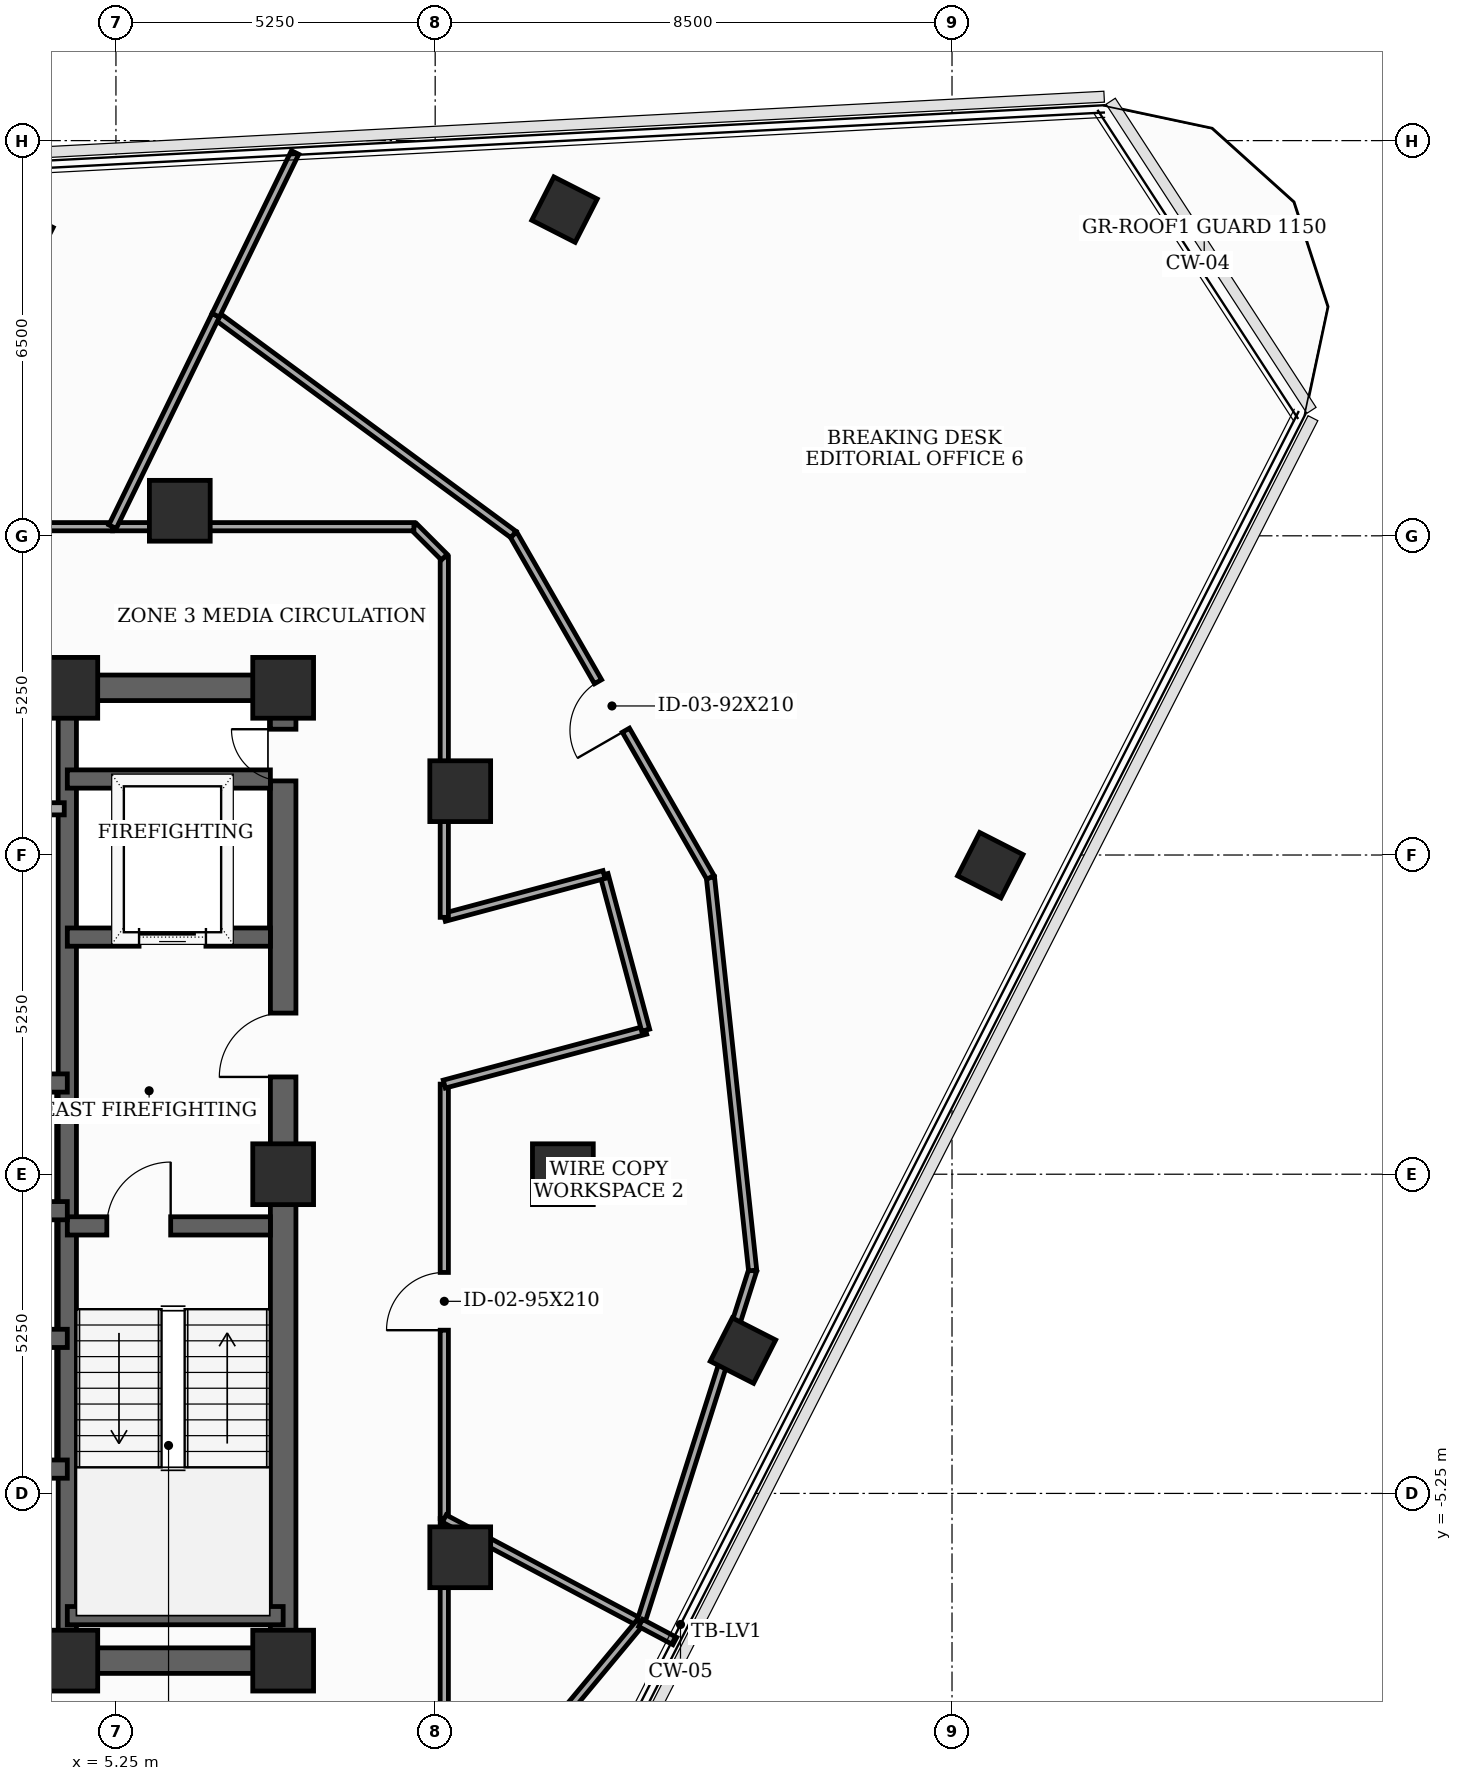
"""IFC4 building model, lengths in metres.
Left out: names, types, materials, properties, quantities, classifications, styles, units other than length and angle.
Written with IfcOpenShell. Run it as: python <this file> out.ifc"""

import sys

from ifc_helpers import new_model, si_unit, direction, frame, frame_2d, origin, origin_2d, place, context, subcontext, project, spatial, rectangle, extrude, element, fill, save


model = new_model("IFC4")
c1 = context("Model", 3, precision=1e-05, world=origin(), true_north=direction((0.0, 1.0)))
c2 = subcontext(c1, "Body", "Model", "MODEL_VIEW")
j1 = project(units=[si_unit("LENGTHUNIT", "METRE"), si_unit("PLANEANGLEUNIT", "RADIAN")], contexts=[c1])
p1 = place(None, origin())
s1 = spatial("IfcSite", under=j1, at=p1, CompositionType="ELEMENT")
p2 = place(p1, origin())
s2 = spatial("IfcBuilding", under=s1, at=p2, CompositionType="ELEMENT")
p3 = place(p2, frame((0.0, 0.0, 259.6)))
s3 = spatial("IfcBuildingStorey", under=s2, at=p3, CompositionType="ELEMENT", Elevation=259.6)
for number, where, z_axis, x_axis in (
    (1, (4.45, -8.0, 0.0), (0.0, 0.0, 1.0), (1.0, 0.0, 0.0)),
    (2, (8.0, -8.0, 0.0), (0.0, 0.0, 1.0), (1.0, 0.0, 0.0)),
    (3, (8.0, 0.0, 0.0), (0.0, 0.0, 1.0), (1.0, 0.0, 0.0)),
    (4, (8.0, 8.0, 0.0), (0.0, 0.0, 1.0), (1.0, 0.0, 0.0)),
    (5, (4.45, 8.0, 0.0), (0.0, 0.0, 1.0), (1.0, 0.0, 0.0)),
    (6, (12.6, 0.0, 0.0), (0.0, 0.0, 1.0), (1.0, 0.0, 0.0)),
    (7, (10.912, 6.3, 0.0), (0.0, 0.0, 1.0), (1.0, 0.0, 0.0)),
    (8, (6.3, 10.912, 0.0), (0.0, 0.0, 1.0), (1.0, 0.0, 0.0)),
    (9, (10.912, -6.3, 0.0), (0.0, 0.0, 1.0), (1.0, 0.0, 0.0)),
):
    element("IfcColumn", number, at=place(p3, frame(where, z_axis=z_axis, x_axis=x_axis)), inside=s3, PredefinedType="COLUMN", context=c2, shape_type="SweptSolid", body=[
        extrude(rectangle(XDim=1.0, YDim=1.0, at=origin_2d()), origin(), (0.0, 0.0, 1.0), 3.7),
    ])
for number, where, z_axis, x_axis in (
    (10, (15.562, -2.901, 0.0), (0.0, 0.0, 1.0), (0.454, 0.891, 0.0)),
    (11, (19.629, 5.082, 0.0), (0.0, 0.0, 1.0), (0.454, 0.891, 0.0)),
    (12, (12.627, 15.865, 0.0), (0.0, 0.0, 1.0), (0.454, 0.891, 0.0)),
    (13, (3.679, 15.396, 0.0), (0.0, 0.0, 1.0), (0.454, 0.891, 0.0)),
):
    element("IfcColumn", number, at=place(p3, frame(where, z_axis=z_axis, x_axis=x_axis)), inside=s3, PredefinedType="COLUMN", context=c2, shape_type="SweptSolid", body=[
        extrude(rectangle(XDim=0.8, YDim=0.8, at=origin_2d()), origin(), (0.0, 0.0, 1.0), 3.7),
    ])
p4 = place(p3, frame((8.0, -8.0, 0.0), z_axis=(0.0, 0.0, 1.0), x_axis=(0.0, 1.0, 0.0)))
e14 = element("IfcWall", 14, at=p4, inside=s3, PredefinedType="SHEAR", context=c2, shape_type="SweptSolid", body=[
    extrude(rectangle(XDim=16.0, YDim=0.42, at=frame_2d((8.0, 0.0))), origin(), (0.0, 0.0, 1.0), 3.5),
])
p5 = place(p4, frame((9.6, 0.0, 0.0)))
e15 = element("IfcOpeningElement", 15, at=p5, cuts=e14, PredefinedType="OPENING", context=c2, shape_type="SweptSolid", body=[
    extrude(rectangle(XDim=1.05, YDim=2.15, at=frame_2d((0.525, 1.075))), frame((0.0, 0.22, 0.0), z_axis=(0.0, -1.0, 0.0), x_axis=(1.0, 0.0, 0.0)), (0.0, 0.0, 1.0), 0.44),
])
p6 = place(p4, frame((14.469, 0.0, 0.0)))
e16 = element("IfcOpeningElement", 16, at=p6, cuts=e14, PredefinedType="OPENING", context=c2, shape_type="SweptSolid", body=[
    extrude(rectangle(XDim=0.85, YDim=2.02, at=frame_2d((0.425, 1.01))), frame((0.0, 0.22, 0.0), z_axis=(0.0, -1.0, 0.0), x_axis=(1.0, 0.0, 0.0)), (0.0, 0.0, 1.0), 0.44),
])
p7 = place(p3, frame((-8.0, -8.0, 0.0), z_axis=(0.0, 0.0, 1.0), x_axis=(1.0, 0.0, 0.0)))
e17 = element("IfcWall", 17, at=p7, inside=s3, PredefinedType="SHEAR", context=c2, shape_type="SweptSolid", body=[
    extrude(rectangle(XDim=16.0, YDim=0.42, at=frame_2d((8.0, 0.0))), origin(), (0.0, 0.0, 1.0), 3.5),
])
p8 = place(p7, frame((5.2, 0.0, 0.0)))
e18 = element("IfcOpeningElement", 18, at=p8, cuts=e17, PredefinedType="OPENING", context=c2, shape_type="SweptSolid", body=[
    extrude(rectangle(XDim=0.95, YDim=2.1, at=frame_2d((0.475, 1.05))), frame((0.0, 0.22, 0.0), z_axis=(0.0, -1.0, 0.0), x_axis=(1.0, 0.0, 0.0)), (0.0, 0.0, 1.0), 0.44),
])
p9 = place(p7, frame((9.8, 0.0, 0.0)))
e19 = element("IfcOpeningElement", 19, at=p9, cuts=e17, PredefinedType="OPENING", context=c2, shape_type="SweptSolid", body=[
    extrude(rectangle(XDim=0.95, YDim=2.1, at=frame_2d((0.475, 1.05))), frame((0.0, 0.22, 0.0), z_axis=(0.0, -1.0, 0.0), x_axis=(1.0, 0.0, 0.0)), (0.0, 0.0, 1.0), 0.44),
])
p10 = place(p3, frame((-8.0, 8.0, 0.0), z_axis=(0.0, 0.0, 1.0), x_axis=(1.0, 0.0, 0.0)))
e20 = element("IfcWall", 20, at=p10, inside=s3, PredefinedType="SHEAR", context=c2, shape_type="SweptSolid", body=[
    extrude(rectangle(XDim=16.0, YDim=0.42, at=frame_2d((8.0, 0.0))), origin(), (0.0, 0.0, 1.0), 3.5),
])
p11 = place(p10, frame((7.1, 0.0, 0.0)))
e21 = element("IfcOpeningElement", 21, at=p11, cuts=e20, PredefinedType="OPENING", context=c2, shape_type="SweptSolid", body=[
    extrude(rectangle(XDim=1.8, YDim=2.15, at=frame_2d((0.9, 1.075))), frame((0.0, 0.22, 0.0), z_axis=(0.0, -1.0, 0.0), x_axis=(1.0, 0.0, 0.0)), (0.0, 0.0, 1.0), 0.44),
])
p12 = place(p3, frame((4.45, -7.79, 0.0), z_axis=(0.0, 0.0, 1.0), x_axis=(0.0, 1.0, 0.0)))
e22 = element("IfcWall", 22, at=p12, inside=s3, PredefinedType="SHEAR", context=c2, shape_type="SweptSolid", body=[
    extrude(rectangle(XDim=15.58, YDim=0.3, at=frame_2d((7.79, 0.0))), origin(), (0.0, 0.0, 1.0), 3.5),
])
p13 = place(p3, frame((4.45, -0.85, 0.0), z_axis=(0.0, 0.0, 1.0), x_axis=(1.0, 0.0, 0.0)))
e23 = element("IfcWall", 23, at=p13, inside=s3, PredefinedType="SHEAR", context=c2, shape_type="SweptSolid", body=[
    extrude(rectangle(XDim=3.34, YDim=0.3, at=frame_2d((1.67, 0.0))), origin(), (0.0, 0.0, 1.0), 3.5),
])
p14 = place(p13, frame((0.65, 0.0, 0.0)))
e24 = element("IfcOpeningElement", 24, at=p14, cuts=e23, PredefinedType="OPENING", context=c2, shape_type="SweptSolid", body=[
    extrude(rectangle(XDim=1.05, YDim=2.15, at=frame_2d((0.525, 1.075))), frame((0.0, 0.16, 0.0), z_axis=(0.0, -1.0, 0.0), x_axis=(1.0, 0.0, 0.0)), (0.0, 0.0, 1.0), 0.32),
])
p15 = place(p3, frame((4.45, -7.26, 0.0), z_axis=(0.0, 0.0, 1.0), x_axis=(1.0, 0.0, 0.0)))
e25 = element("IfcWall", 25, at=p15, inside=s3, PredefinedType="SHEAR", context=c2, shape_type="SweptSolid", body=[
    extrude(rectangle(XDim=3.55, YDim=0.3, at=frame_2d((1.775, 0.0))), origin(), (0.0, 0.0, 1.0), 3.5),
])
p16 = place(p3, frame((4.45, 3.9, 0.0), z_axis=(0.0, 0.0, 1.0), x_axis=(1.0, 0.0, 0.0)))
e26 = element("IfcWall", 26, at=p16, inside=s3, PredefinedType="SHEAR", context=c2, shape_type="SweptSolid", body=[
    extrude(rectangle(XDim=3.34, YDim=0.3, at=frame_2d((1.67, 0.0))), origin(), (0.0, 0.0, 1.0), 3.5),
])
p17 = place(p16, frame((1.18, 0.0, 0.0)))
e27 = element("IfcOpeningElement", 27, at=p17, cuts=e26, PredefinedType="OPENING", context=c2, shape_type="SweptSolid", body=[
    extrude(rectangle(XDim=1.1, YDim=2.1, at=frame_2d((0.55, 1.05))), frame((0.0, 0.16, 0.0), z_axis=(0.0, -1.0, 0.0), x_axis=(1.0, 0.0, 0.0)), (0.0, 0.0, 1.0), 0.32),
])
p18 = place(p3, frame((4.45, 6.5, 0.0), z_axis=(0.0, 0.0, 1.0), x_axis=(1.0, 0.0, 0.0)))
e28 = element("IfcWall", 28, at=p18, inside=s3, PredefinedType="SHEAR", context=c2, shape_type="SweptSolid", body=[
    extrude(rectangle(XDim=3.34, YDim=0.3, at=frame_2d((1.67, 0.0))), origin(), (0.0, 0.0, 1.0), 3.5),
])
p19 = place(p3, frame((-4.45, -4.85, 0.0), z_axis=(0.0, 0.0, 1.0), x_axis=(1.0, 0.0, 0.0)))
e29 = element("IfcWall", 29, at=p19, inside=s3, PredefinedType="SHEAR", context=c2, shape_type="SweptSolid", body=[
    extrude(rectangle(XDim=8.9, YDim=0.3, at=frame_2d((4.45, 0.0))), origin(), (0.0, 0.0, 1.0), 3.5),
])
for number, where, z_axis, x_axis in (
    (30, (1.68, 1.5, 0.0), (0.0, 0.0, 1.0), (1.0, 0.0, 0.0)),
    (31, (1.68, -2.7, 0.0), (0.0, 0.0, 1.0), (1.0, 0.0, 0.0)),
    (32, (1.68, -0.6, 0.0), (0.0, 0.0, 1.0), (1.0, 0.0, 0.0)),
):
    element("IfcWall", number, at=place(p3, frame(where, z_axis=z_axis, x_axis=x_axis)), inside=s3, PredefinedType="SHEAR", context=c2, shape_type="SweptSolid", body=[
        extrude(rectangle(XDim=2.77, YDim=0.3, at=frame_2d((1.385, 0.0))), origin(), (0.0, 0.0, 1.0), 3.5),
    ])
p20 = place(p3, frame((1.72, 6.01, 0.0), z_axis=(0.0, 0.0, 1.0), x_axis=(1.0, 0.0, 0.0)))
e33 = element("IfcWall", 33, at=p20, inside=s3, PredefinedType="SOLIDWALL", context=c2, shape_type="SweptSolid", body=[
    extrude(rectangle(XDim=2.68, YDim=0.2, at=frame_2d((1.34, 0.0))), origin(), (0.0, 0.0, 1.0), 3.5),
])
p21 = place(p3, frame((10.65, -5.663, 0.0), z_axis=(0.0, 0.0, 1.0), x_axis=(0.0, 1.0, 0.0)))
e34 = element("IfcWall", 34, at=p21, inside=s3, PredefinedType="PARTITIONING", context=c2, shape_type="SweptSolid", body=[
    extrude(rectangle(XDim=7.145, YDim=0.135, at=frame_2d((3.573, 0.0))), origin(), (0.0, 0.0, 1.0), 2.885),
])
p22 = place(p21, frame((3.097, 0.0, 0.0)))
e35 = element("IfcOpeningElement", 35, at=p22, cuts=e34, PredefinedType="OPENING", context=c2, shape_type="SweptSolid", body=[
    extrude(rectangle(XDim=0.95, YDim=2.1, at=frame_2d((0.475, 1.05))), frame((0.0, 0.077, 0.0), z_axis=(0.0, -1.0, 0.0), x_axis=(1.0, 0.0, 0.0)), (0.0, 0.0, 1.0), 0.155),
])
p23 = place(p3, frame((10.65, 1.482, 0.0), z_axis=(0.0, 0.0, 1.0), x_axis=(0.965961397105, 0.2586862565, 0.0)))
e36 = element("IfcWall", 36, at=p23, inside=s3, PredefinedType="PARTITIONING", context=c2, shape_type="SweptSolid", body=[
    extrude(rectangle(XDim=3.429, YDim=0.135, at=frame_2d((1.714, 0.0))), origin(), (0.0, 0.0, 1.0), 2.885),
])
p24 = place(p3, frame((13.962, 2.369, 0.0), z_axis=(0.0, 0.0, 1.0), x_axis=(-0.258413725385, 0.966034340245, 0.0)))
e37 = element("IfcWall", 37, at=p24, inside=s3, PredefinedType="PARTITIONING", context=c2, shape_type="SweptSolid", body=[
    extrude(rectangle(XDim=2.65, YDim=0.135, at=frame_2d((1.325, 0.0))), origin(), (0.0, 0.0, 1.0), 3.5),
])
p25 = place(p3, frame((13.277, 4.929, 0.0), z_axis=(0.0, 0.0, 1.0), x_axis=(-0.965934830229, -0.258785439601, 0.0)))
e38 = element("IfcWall", 38, at=p25, inside=s3, PredefinedType="PARTITIONING", context=c2, shape_type="SweptSolid", body=[
    extrude(rectangle(XDim=2.72, YDim=0.135, at=frame_2d((1.36, 0.0))), origin(), (0.0, 0.0, 1.0), 2.885),
])
p26 = place(p3, frame((10.65, 4.225, 0.0), z_axis=(0.0, 0.0, 1.0), x_axis=(0.0, 1.0, 0.0)))
e39 = element("IfcWall", 39, at=p26, inside=s3, PredefinedType="PARTITIONING", context=c2, shape_type="SweptSolid", body=[
    extrude(rectangle(XDim=5.925, YDim=0.135, at=frame_2d((2.962, 0.0))), origin(), (0.0, 0.0, 1.0), 2.885),
])
p27 = place(p3, frame((10.65, 10.15, 0.0), z_axis=(0.0, 0.0, 1.0), x_axis=(-0.707106781187, 0.707106781187, 0.0)))
e40 = element("IfcWall", 40, at=p27, inside=s3, PredefinedType="PARTITIONING", context=c2, shape_type="SweptSolid", body=[
    extrude(rectangle(XDim=0.707, YDim=0.135, at=frame_2d((0.354, 0.0))), origin(), (0.0, 0.0, 1.0), 3.5),
])
p28 = place(p3, frame((10.15, 10.65, 0.0), z_axis=(0.0, 0.0, 1.0), x_axis=(-1.0, 0.0, 0.0)))
e41 = element("IfcWall", 41, at=p28, inside=s3, PredefinedType="PARTITIONING", context=c2, shape_type="SweptSolid", body=[
    extrude(rectangle(XDim=4.956, YDim=0.135, at=frame_2d((2.478, 0.0))), origin(), (0.0, 0.0, 1.0), 2.885),
])
p29 = place(p3, frame((10.65, -10.15, 0.0), z_axis=(0.0, 0.0, 1.0), x_axis=(0.0, 1.0, 0.0)))
e42 = element("IfcWall", 42, at=p29, inside=s3, PredefinedType="PARTITIONING", context=c2, shape_type="SweptSolid", body=[
    extrude(rectangle(XDim=4.487, YDim=0.135, at=frame_2d((2.243, 0.0))), origin(), (0.0, 0.0, 1.0), 2.885),
])
p30 = place(p3, frame((5.194, 10.65, 0.0), z_axis=(0.0, 0.0, 1.0), x_axis=(-1.0, 0.0, 0.0)))
e43 = element("IfcWall", 43, at=p30, inside=s3, PredefinedType="PARTITIONING", context=c2, shape_type="SweptSolid", body=[
    extrude(rectangle(XDim=6.344, YDim=0.135, at=frame_2d((3.172, 0.0))), origin(), (0.0, 0.0, 1.0), 2.885),
])
p31 = place(p30, frame((2.697, 0.0, 0.0)))
e44 = element("IfcOpeningElement", 44, at=p31, cuts=e43, PredefinedType="OPENING", context=c2, shape_type="SweptSolid", body=[
    extrude(rectangle(XDim=0.95, YDim=2.1, at=frame_2d((0.475, 1.05))), frame((0.0, 0.077, 0.0), z_axis=(0.0, -1.0, 0.0), x_axis=(1.0, 0.0, 0.0)), (0.0, 0.0, 1.0), 0.155),
])
p32 = place(p3, frame((10.65, -5.663, 0.0), z_axis=(0.0, 0.0, 1.0), x_axis=(0.882982204984, -0.469406461057, 0.0)))
e45 = element("IfcWall", 45, at=p32, inside=s3, PredefinedType="PARTITIONING", context=c2, shape_type="SweptSolid", body=[
    extrude(rectangle(XDim=3.647, YDim=0.135, at=frame_2d((1.823, 0.0))), origin(), (0.0, 0.0, 1.0), 2.885),
])
p33 = place(p3, frame((13.887, -7.354, 0.0), z_axis=(0.0, 0.0, 1.0), x_axis=(0.302867480059, 0.953032680197, 0.0)))
e46 = element("IfcWall", 46, at=p33, inside=s3, PredefinedType="PARTITIONING", context=c2, shape_type="SweptSolid", body=[
    extrude(rectangle(XDim=6.055, YDim=0.135, at=frame_2d((3.028, 0.0))), origin(), (0.0, 0.0, 1.0), 3.035),
])
p34 = place(p3, frame((15.721, -1.583, 0.0), z_axis=(0.0, 0.0, 1.0), x_axis=(-0.106709447524, 0.994290246261, 0.0)))
e47 = element("IfcWall", 47, at=p34, inside=s3, PredefinedType="PARTITIONING", context=c2, shape_type="SweptSolid", body=[
    extrude(rectangle(XDim=6.502, YDim=0.135, at=frame_2d((3.251, 0.0))), origin(), (0.0, 0.0, 1.0), 3.035),
])
p35 = place(p3, frame((15.027, 4.882, 0.0), z_axis=(0.0, 0.0, 1.0), x_axis=(-0.498082419026, 0.867129692639, 0.0)))
e48 = element("IfcWall", 48, at=p35, inside=s3, PredefinedType="PARTITIONING", context=c2, shape_type="SweptSolid", body=[
    extrude(rectangle(XDim=6.503, YDim=0.135, at=frame_2d((3.251, 0.0))), origin(), (0.0, 0.0, 1.0), 3.185),
])
p36 = place(p35, frame((2.792, 0.0, 0.0)))
e49 = element("IfcOpeningElement", 49, at=p36, cuts=e48, PredefinedType="OPENING", context=c2, shape_type="SweptSolid", body=[
    extrude(rectangle(XDim=0.92, YDim=2.1, at=frame_2d((0.46, 1.05))), frame((0.0, 0.077, 0.0), z_axis=(0.0, -1.0, 0.0), x_axis=(1.0, 0.0, 0.0)), (0.0, 0.0, 1.0), 0.155),
])
p37 = place(p3, frame((11.788, 10.521, 0.0), z_axis=(0.0, 0.0, 1.0), x_axis=(-0.805162772786, 0.593053883993, 0.0)))
e50 = element("IfcWall", 50, at=p37, inside=s3, PredefinedType="PARTITIONING", context=c2, shape_type="SweptSolid", body=[
    extrude(rectangle(XDim=6.082, YDim=0.135, at=frame_2d((3.041, 0.0))), origin(), (0.0, 0.0, 1.0), 3.035),
])
p38 = place(p3, frame((6.891, 14.128, 0.0), z_axis=(0.0, 0.0, 1.0), x_axis=(-0.438511877771, -0.898725393573, 0.0)))
e51 = element("IfcWall", 51, at=p38, inside=s3, PredefinedType="PARTITIONING", context=c2, shape_type="SweptSolid", body=[
    extrude(rectangle(XDim=3.87, YDim=0.135, at=frame_2d((1.935, 0.0))), origin(), (0.0, 0.0, 1.0), 2.885),
])
p39 = place(p3, frame((13.87, -7.375, 0.0), z_axis=(0.0, 0.0, 1.0), x_axis=(-0.63949044568, -0.768799043888, 0.0)))
e52 = element("IfcWall", 52, at=p39, inside=s3, PredefinedType="PARTITIONING", context=c2, shape_type="SweptSolid", body=[
    extrude(rectangle(XDim=6.82, YDim=0.135, at=frame_2d((3.41, 0.0))), origin(), (0.0, 0.0, 1.0), 3.035),
])
p40 = place(p3, frame((14.441, -7.678, 0.0), z_axis=(0.0, 0.0, 1.0), x_axis=(-0.883423592085, 0.468575241501, 0.0)))
e53 = element("IfcWall", 53, at=p40, inside=s3, PredefinedType="PARTITIONING", context=c2, shape_type="SweptSolid", body=[
    extrude(rectangle(XDim=0.636, YDim=0.135, at=frame_2d((0.318, 0.0))), origin(), (0.0, 0.0, 1.0), 3.5),
])
p41 = place(p3, frame((8.196, 16.805, 0.0), z_axis=(0.0, 0.0, 1.0), x_axis=(-0.438139314435, -0.898907081486, 0.0)))
e54 = element("IfcWall", 54, at=p41, inside=s3, PredefinedType="PARTITIONING", context=c2, shape_type="SweptSolid", body=[
    extrude(rectangle(XDim=2.978, YDim=0.135, at=frame_2d((1.489, 0.0))), origin(), (0.0, 0.0, 1.0), 3.035),
])
p42 = place(p5, origin())
e55 = element("IfcDoor", 55, at=p42, inside=s3, OperationType="SINGLE_SWING_LEFT", PredefinedType="DOOR", context=c2, shape_type="SweptSolid", body=[
    extrude(rectangle(XDim=1.05, YDim=2.15, at=frame_2d((0.525, 1.075))), frame((0.0, 0.025, 0.0), z_axis=(0.0, -1.0, 0.0), x_axis=(1.0, 0.0, 0.0)), (0.0, 0.0, 1.0), 0.05),
])
fill(e15, e55)
p43 = place(p6, origin())
e56 = element("IfcDoor", 56, at=p43, inside=s3, OperationType="SINGLE_SWING_RIGHT", PredefinedType="TRAPDOOR", context=c2, shape_type="SweptSolid", body=[
    extrude(rectangle(XDim=0.85, YDim=2.02, at=frame_2d((0.425, 1.01))), frame((0.0, 0.025, 0.0), z_axis=(0.0, -1.0, 0.0), x_axis=(1.0, 0.0, 0.0)), (0.0, 0.0, 1.0), 0.05),
])
fill(e16, e56)
p44 = place(p14, origin())
e57 = element("IfcDoor", 57, at=p44, inside=s3, OperationType="SINGLE_SWING_RIGHT", PredefinedType="DOOR", context=c2, shape_type="SweptSolid", body=[
    extrude(rectangle(XDim=1.05, YDim=2.15, at=frame_2d((0.525, 1.075))), frame((0.0, 0.025, 0.0), z_axis=(0.0, -1.0, 0.0), x_axis=(1.0, 0.0, 0.0)), (0.0, 0.0, 1.0), 0.05),
])
fill(e24, e57)
p45 = place(p17, origin())
e58 = element("IfcDoor", 58, at=p45, inside=s3, OperationType="SLIDING_TO_LEFT", PredefinedType="DOOR", context=c2, shape_type="SweptSolid", body=[
    extrude(rectangle(XDim=1.1, YDim=2.1, at=frame_2d((0.55, 1.05))), frame((0.0, 0.025, 0.0), z_axis=(0.0, -1.0, 0.0), x_axis=(1.0, 0.0, 0.0)), (0.0, 0.0, 1.0), 0.05),
])
fill(e27, e58)
p46 = place(p22, origin())
e59 = element("IfcDoor", 59, at=p46, inside=s3, OperationType="SINGLE_SWING_LEFT", PredefinedType="DOOR", context=c2, shape_type="SweptSolid", body=[
    extrude(rectangle(XDim=0.95, YDim=2.1, at=frame_2d((0.475, 1.05))), frame((0.0, 0.025, 0.0), z_axis=(0.0, -1.0, 0.0), x_axis=(1.0, 0.0, 0.0)), (0.0, 0.0, 1.0), 0.05),
])
fill(e35, e59)
p47 = place(p36, origin())
e60 = element("IfcDoor", 60, at=p47, inside=s3, OperationType="SINGLE_SWING_LEFT", PredefinedType="DOOR", context=c2, shape_type="SweptSolid", body=[
    extrude(rectangle(XDim=0.92, YDim=2.1, at=frame_2d((0.46, 1.05))), frame((0.0, 0.025, 0.0), z_axis=(0.0, -1.0, 0.0), x_axis=(1.0, 0.0, 0.0)), (0.0, 0.0, 1.0), 0.05),
])
fill(e49, e60)
save(model, sys.argv[1])
